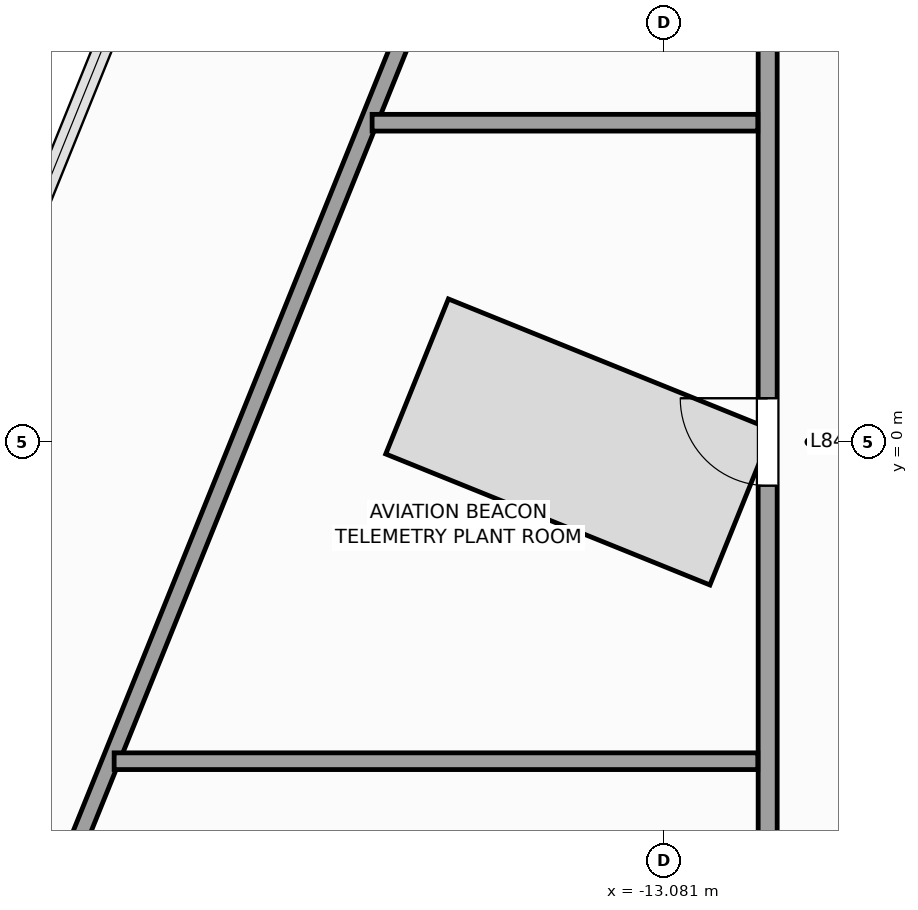
"""IFC4 building model, lengths in metres.
Left out: names, types, materials, properties, quantities, classifications, styles, units other than length and angle.
Written with IfcOpenShell. Run it as: python <this file> out.ifc"""

import sys

from ifc_helpers import new_model, si_unit, direction, frame, frame_2d, origin, place, context, subcontext, project, spatial, rectangle, extrude, source, transform, mapped, element, fill, save


model = new_model("IFC4")
c1 = context("Model", 3, precision=1e-05, world=origin(), true_north=direction((0.0, 1.0)))
c2 = subcontext(c1, "Body", "Model", "MODEL_VIEW")
j1 = project(units=[si_unit("LENGTHUNIT", "METRE"), si_unit("PLANEANGLEUNIT", "RADIAN")], contexts=[c1])
p1 = place(None, origin())
s1 = spatial("IfcSite", under=j1, at=p1, CompositionType="ELEMENT")
p2 = place(p1, origin())
s2 = spatial("IfcBuilding", under=s1, at=p2, CompositionType="ELEMENT")
p3 = place(p2, frame((0.0, 0.0, 341.6)))
s3 = spatial("IfcBuildingStorey", under=s2, at=p3, CompositionType="ELEMENT", Elevation=341.6)
p4 = place(p3, frame((-11.172, 18.556, 0.0), z_axis=(0.0, 0.0, 1.0), x_axis=(-0.374611707018, -0.927181788521, 0.0)))
e1 = element("IfcWall", 1, at=p4, inside=s3, PredefinedType="PARTITIONING", context=c2, shape_type="SweptSolid", body=[
    extrude(rectangle(XDim=26.04, YDim=0.22, at=frame_2d((13.02, 0.0))), origin(), (0.0, 0.0, 1.0), 3.0),
])
p5 = place(p3, frame((-11.72, -11.62, 0.0), z_axis=(0.0, 0.0, 1.0), x_axis=(0.0, 1.0, 0.0)))
e2 = element("IfcWall", 2, at=p5, inside=s3, PredefinedType="PARTITIONING", context=c2, shape_type="SweptSolid", body=[
    extrude(rectangle(XDim=21.84, YDim=0.25, at=frame_2d((10.92, 0.0))), origin(), (0.0, 0.0, 1.0), 3.65),
])
p6 = place(p5, frame((11.045, 0.0, 0.0)))
e3 = element("IfcOpeningElement", 3, at=p6, cuts=e2, PredefinedType="OPENING", context=c2, shape_type="SweptSolid", body=[
    extrude(rectangle(XDim=1.15, YDim=2.25, at=frame_2d((0.575, 1.125))), frame((0.0, 0.135, 0.0), z_axis=(0.0, -1.0, 0.0), x_axis=(1.0, 0.0, 0.0)), (0.0, 0.0, 1.0), 0.27),
])
p7 = place(p3, frame((-11.85, 4.2, 0.0), z_axis=(0.0, 0.0, 1.0), x_axis=(-1.0, 0.0, 0.0)))
e4 = element("IfcWall", 4, at=p7, inside=s3, PredefinedType="PARTITIONING", context=c2, shape_type="SweptSolid", body=[
    extrude(rectangle(XDim=5.074, YDim=0.22, at=frame_2d((2.537, 0.0))), origin(), (0.0, 0.0, 1.0), 3.65),
])
p8 = place(p3, frame((-11.85, -4.2, 0.0), z_axis=(0.0, 0.0, 1.0), x_axis=(-1.0, 0.0, 0.0)))
e5 = element("IfcWall", 5, at=p8, inside=s3, PredefinedType="PARTITIONING", context=c2, shape_type="SweptSolid", body=[
    extrude(rectangle(XDim=8.468, YDim=0.22, at=frame_2d((4.234, 0.0))), origin(), (0.0, 0.0, 1.0), 3.65),
])
m1 = source(origin(), c2, "Body", "SweptSolid", [
    extrude(rectangle(XDim=1.15, YDim=2.25, at=frame_2d((0.575, 1.125))), frame((0.0, 0.025, 0.0), z_axis=(0.0, -1.0, 0.0), x_axis=(1.0, 0.0, 0.0)), (0.0, 0.0, 1.0), 0.05),
])
p9 = place(p6, origin())
e6 = element("IfcDoor", 6, at=p9, inside=s3, OperationType="SINGLE_SWING_RIGHT", PredefinedType="DOOR", context=c2, shape_type="MappedRepresentation", body=[
    mapped(m1, transform((0.0, 0.0, 0.0), scale=1.0)),
])
fill(e3, e6)
save(model, sys.argv[1])
